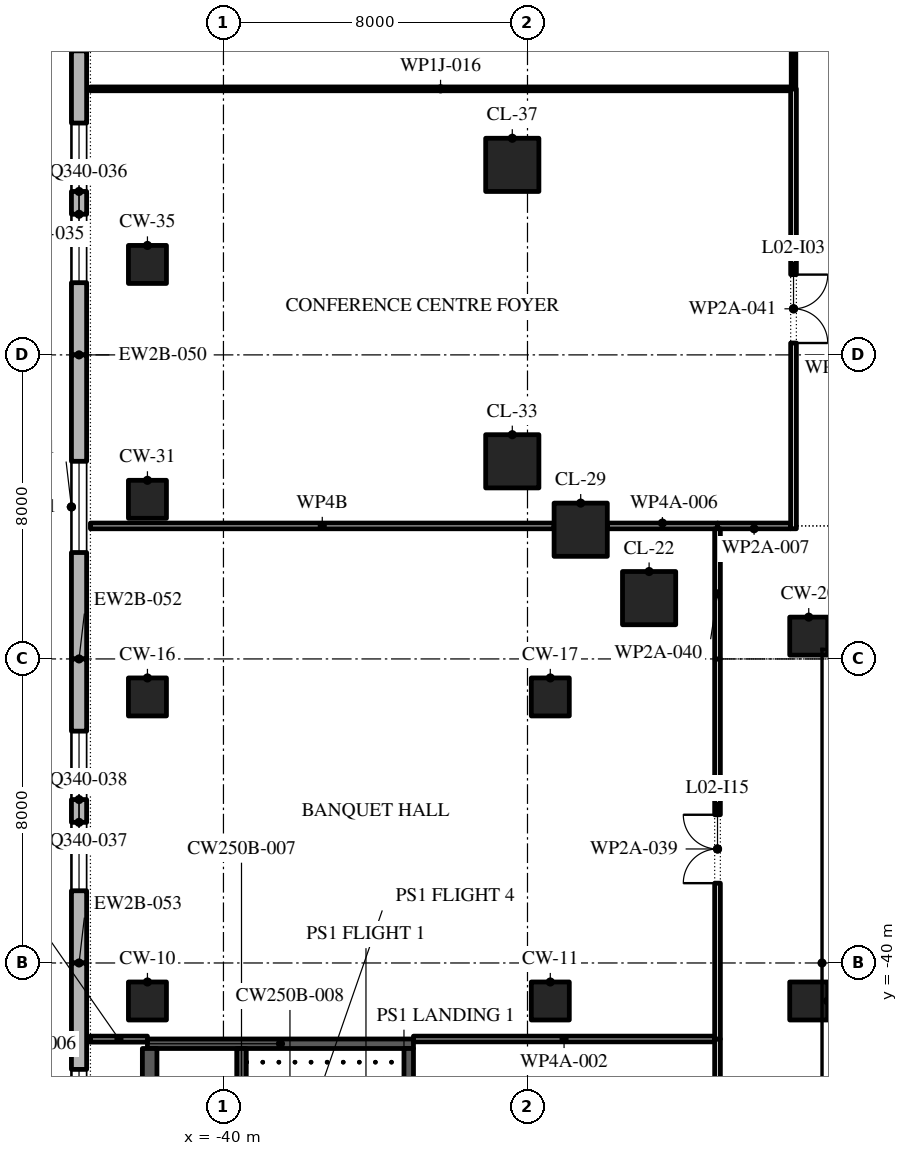
"""IFC4 building model, lengths in metres.
Left out: names, types, materials, properties, quantities, classifications, styles, units other than length and angle.
Written with IfcOpenShell. Run it as: python <this file> out.ifc"""

import sys

from ifc_helpers import new_model, si_unit, direction, frame, frame_2d, origin, origin_2d, place, context, subcontext, project, spatial, polyline, rectangle, outline, extrude, element, fill, save


model = new_model("IFC4")
c1 = context("Model", 3, precision=1e-05, world=origin(), true_north=direction((0.0, 1.0)))
c2 = subcontext(c1, "Body", "Model", "MODEL_VIEW")
j1 = project(units=[si_unit("LENGTHUNIT", "METRE"), si_unit("PLANEANGLEUNIT", "RADIAN")], contexts=[c1])
p1 = place(None, origin())
s1 = spatial("IfcSite", under=j1, at=p1, CompositionType="ELEMENT")
p2 = place(p1, origin())
s2 = spatial("IfcBuilding", under=s1, at=p2, CompositionType="ELEMENT")
p3 = place(p2, frame((0.0, 0.0, 14.0)))
s3 = spatial("IfcBuildingStorey", under=s2, at=p3, CompositionType="ELEMENT", Elevation=14.0)
for number, where, z_axis, x_axis in (
    (1, (-42.0, -41.0, 0.0), (0.0, 0.0, 1.0), (1.0, 0.0, 0.0)),
    (2, (-31.4, -41.0, 0.0), (0.0, 0.0, 1.0), (1.0, 0.0, 0.0)),
    (3, (-24.6, -41.0, 0.0), (0.0, 0.0, 1.0), (1.0, 0.0, 0.0)),
    (4, (-42.0, -33.0, 0.0), (0.0, 0.0, 1.0), (1.0, 0.0, 0.0)),
    (5, (-31.4, -33.0, 0.0), (0.0, 0.0, 1.0), (1.0, 0.0, 0.0)),
    (6, (-24.6, -31.4, 0.0), (0.0, 0.0, 1.0), (1.0, 0.0, 0.0)),
):
    element("IfcColumn", number, at=place(p3, frame(where, z_axis=z_axis, x_axis=x_axis)), inside=s3, PredefinedType="COLUMN", context=c2, shape_type="SweptSolid", body=[
        extrude(rectangle(XDim=1.0, YDim=1.0, at=origin_2d()), origin(), (0.0, 0.0, 1.0), 5.2),
    ])
for number, where, z_axis, x_axis in (
    (7, (-28.8, -30.4, 0.0), (0.0, 0.0, 1.0), (1.0, 0.0, 0.0)),
    (8, (-30.6, -28.6, 0.0), (0.0, 0.0, 1.0), (1.0, 0.0, 0.0)),
):
    element("IfcColumn", number, at=place(p3, frame(where, z_axis=z_axis, x_axis=x_axis)), inside=s3, PredefinedType="COLUMN", context=c2, shape_type="SweptSolid", body=[
        extrude(rectangle(XDim=1.4, YDim=1.4, at=origin_2d()), origin(), (0.0, 0.0, 1.0), 5.2),
    ])
p4 = place(p3, frame((-42.0, -27.8, 0.0), z_axis=(0.0, 0.0, 1.0), x_axis=(1.0, 0.0, 0.0)))
e9 = element("IfcColumn", 9, at=p4, inside=s3, PredefinedType="COLUMN", context=c2, shape_type="SweptSolid", body=[
    extrude(rectangle(XDim=1.0, YDim=1.0, at=origin_2d()), origin(), (0.0, 0.0, 1.0), 5.2),
])
p5 = place(p3, frame((-32.4, -26.8, 0.0), z_axis=(0.0, 0.0, 1.0), x_axis=(1.0, 0.0, 0.0)))
e10 = element("IfcColumn", 10, at=p5, inside=s3, PredefinedType="COLUMN", context=c2, shape_type="SweptSolid", body=[
    extrude(rectangle(XDim=1.4, YDim=1.4, at=origin_2d()), origin(), (0.0, 0.0, 1.0), 5.2),
])
p6 = place(p3, frame((-42.0, -21.62, 0.0), z_axis=(0.0, 0.0, 1.0), x_axis=(1.0, 0.0, 0.0)))
e11 = element("IfcColumn", 11, at=p6, inside=s3, PredefinedType="COLUMN", context=c2, shape_type="SweptSolid", body=[
    extrude(rectangle(XDim=1.0, YDim=1.0, at=origin_2d()), origin(), (0.0, 0.0, 1.0), 5.2),
])
p7 = place(p3, frame((-32.4, -19.0, 0.0), z_axis=(0.0, 0.0, 1.0), x_axis=(1.0, 0.0, 0.0)))
e12 = element("IfcColumn", 12, at=p7, inside=s3, PredefinedType="COLUMN", context=c2, shape_type="SweptSolid", body=[
    extrude(rectangle(XDim=1.4, YDim=1.4, at=origin_2d()), origin(), (0.0, 0.0, 1.0), 5.2),
])
p8 = place(p3, frame((-43.8, -16.0, 0.0), z_axis=(0.0, 0.0, 1.0), x_axis=(0.0, -1.0, 0.0)))
e13 = element("IfcWall", 13, at=p8, inside=s3, PredefinedType="STANDARD", context=c2, shape_type="SweptSolid", body=[
    extrude(rectangle(XDim=8.0, YDim=0.4, at=frame_2d((4.0, 0.0))), origin(), (0.0, 0.0, 1.0), 4.9),
])
p9 = place(p8, frame((1.9, 0.0, 0.9)))
e14 = element("IfcOpeningElement", 14, at=p9, cuts=e13, PredefinedType="OPENING", context=c2, shape_type="SweptSolid", body=[
    extrude(outline(polyline([(0.0, 0.0), (1.8, 0.0), (1.8, 1.841), (1.785, 2.076), (1.739, 2.307), (1.663, 2.53), (1.559, 2.741), (1.428, 2.937), (1.273, 3.114), (1.096, 3.269), (0.9, 3.4), (0.704, 3.269), (0.527, 3.114), (0.372, 2.937), (0.241, 2.741), (0.137, 2.53), (0.061, 2.307), (0.015, 2.076), (0.0, 1.841), (0.0, 0.0)])), frame((0.0, 0.21, 0.0), z_axis=(0.0, -1.0, 0.0), x_axis=(1.0, 0.0, 0.0)), (0.0, 0.0, 1.0), 0.42),
])
p10 = place(p8, frame((4.3, 0.0, 0.9)))
e15 = element("IfcOpeningElement", 15, at=p10, cuts=e13, PredefinedType="OPENING", context=c2, shape_type="SweptSolid", body=[
    extrude(outline(polyline([(0.0, 0.0), (1.8, 0.0), (1.8, 1.841), (1.785, 2.076), (1.739, 2.307), (1.663, 2.53), (1.559, 2.741), (1.428, 2.937), (1.273, 3.114), (1.096, 3.269), (0.9, 3.4), (0.704, 3.269), (0.527, 3.114), (0.372, 2.937), (0.241, 2.741), (0.137, 2.53), (0.061, 2.307), (0.015, 2.076), (0.0, 1.841), (0.0, 0.0)])), frame((0.0, 0.21, 0.0), z_axis=(0.0, -1.0, 0.0), x_axis=(1.0, 0.0, 0.0)), (0.0, 0.0, 1.0), 0.42),
])
p11 = place(p3, frame((-43.8, -24.0, 0.0), z_axis=(0.0, 0.0, 1.0), x_axis=(0.0, -1.0, 0.0)))
e16 = element("IfcWall", 16, at=p11, inside=s3, PredefinedType="STANDARD", context=c2, shape_type="SweptSolid", body=[
    extrude(rectangle(XDim=8.0, YDim=0.4, at=frame_2d((4.0, 0.0))), origin(), (0.0, 0.0, 1.0), 4.9),
])
p12 = place(p11, frame((2.8, 0.0, 0.9)))
e17 = element("IfcOpeningElement", 17, at=p12, cuts=e16, PredefinedType="OPENING", context=c2, shape_type="SweptSolid", body=[
    extrude(outline(polyline([(0.0, 0.0), (2.4, 0.0), (2.4, 1.7), (2.379, 1.976), (2.315, 2.246), (2.212, 2.502), (2.07, 2.74), (1.893, 2.954), (1.686, 3.137), (1.453, 3.287), (1.2, 3.4), (0.947, 3.287), (0.714, 3.137), (0.507, 2.954), (0.33, 2.74), (0.188, 2.502), (0.084, 2.246), (0.021, 1.976), (0.0, 1.7), (0.0, 0.0)])), frame((0.0, 0.21, 0.0), z_axis=(0.0, -1.0, 0.0), x_axis=(1.0, 0.0, 0.0)), (0.0, 0.0, 1.0), 0.42),
])
p13 = place(p3, frame((-43.8, -32.0, 0.0), z_axis=(0.0, 0.0, 1.0), x_axis=(0.0, -1.0, 0.0)))
e18 = element("IfcWall", 18, at=p13, inside=s3, PredefinedType="STANDARD", context=c2, shape_type="SweptSolid", body=[
    extrude(rectangle(XDim=8.0, YDim=0.4, at=frame_2d((4.0, 0.0))), origin(), (0.0, 0.0, 1.0), 4.9),
])
p14 = place(p13, frame((1.9, 0.0, 0.9)))
e19 = element("IfcOpeningElement", 19, at=p14, cuts=e18, PredefinedType="OPENING", context=c2, shape_type="SweptSolid", body=[
    extrude(outline(polyline([(0.0, 0.0), (1.8, 0.0), (1.8, 1.841), (1.785, 2.076), (1.739, 2.307), (1.663, 2.53), (1.559, 2.741), (1.428, 2.937), (1.273, 3.114), (1.096, 3.269), (0.9, 3.4), (0.704, 3.269), (0.527, 3.114), (0.372, 2.937), (0.241, 2.741), (0.137, 2.53), (0.061, 2.307), (0.015, 2.076), (0.0, 1.841), (0.0, 0.0)])), frame((0.0, 0.21, 0.0), z_axis=(0.0, -1.0, 0.0), x_axis=(1.0, 0.0, 0.0)), (0.0, 0.0, 1.0), 0.42),
])
p15 = place(p13, frame((4.3, 0.0, 0.9)))
e20 = element("IfcOpeningElement", 20, at=p15, cuts=e18, PredefinedType="OPENING", context=c2, shape_type="SweptSolid", body=[
    extrude(outline(polyline([(0.0, 0.0), (1.8, 0.0), (1.8, 1.841), (1.785, 2.076), (1.739, 2.307), (1.663, 2.53), (1.559, 2.741), (1.428, 2.937), (1.273, 3.114), (1.096, 3.269), (0.9, 3.4), (0.704, 3.269), (0.527, 3.114), (0.372, 2.937), (0.241, 2.741), (0.137, 2.53), (0.061, 2.307), (0.015, 2.076), (0.0, 1.841), (0.0, 0.0)])), frame((0.0, 0.21, 0.0), z_axis=(0.0, -1.0, 0.0), x_axis=(1.0, 0.0, 0.0)), (0.0, 0.0, 1.0), 0.42),
])
p16 = place(p3, frame((-43.8, -40.0, 0.0), z_axis=(0.0, 0.0, 1.0), x_axis=(0.0, -1.0, 0.0)))
e21 = element("IfcWall", 21, at=p16, inside=s3, PredefinedType="STANDARD", context=c2, shape_type="SweptSolid", body=[
    extrude(rectangle(XDim=8.0, YDim=0.4, at=frame_2d((4.0, 0.0))), origin(), (0.0, 0.0, 1.0), 4.9),
])
p17 = place(p16, frame((2.8, 0.0, 0.9)))
e22 = element("IfcOpeningElement", 22, at=p17, cuts=e21, PredefinedType="OPENING", context=c2, shape_type="SweptSolid", body=[
    extrude(outline(polyline([(0.0, 0.0), (2.4, 0.0), (2.4, 1.7), (2.379, 1.976), (2.315, 2.246), (2.212, 2.502), (2.07, 2.74), (1.893, 2.954), (1.686, 3.137), (1.453, 3.287), (1.2, 3.4), (0.947, 3.287), (0.714, 3.137), (0.507, 2.954), (0.33, 2.74), (0.188, 2.502), (0.084, 2.246), (0.021, 1.976), (0.0, 1.7), (0.0, 0.0)])), frame((0.0, 0.21, 0.0), z_axis=(0.0, -1.0, 0.0), x_axis=(1.0, 0.0, 0.0)), (0.0, 0.0, 1.0), 0.42),
])
p18 = place(p3, frame((-42.0, -42.125, 0.0), z_axis=(0.0, 0.0, 1.0), x_axis=(1.0, 0.0, 0.0)))
e23 = element("IfcWall", 23, at=p18, inside=s3, PredefinedType="SHEAR", context=c2, shape_type="SweptSolid", body=[
    extrude(rectangle(XDim=7.0, YDim=0.25, at=frame_2d((3.5, 0.0))), origin(), (0.0, 0.0, 1.0), 4.9),
])
p19 = place(p3, frame((-41.942, -49.5, 0.0), z_axis=(0.0, 0.0, 1.0), x_axis=(0.0, 1.0, 0.0)))
e24 = element("IfcWall", 24, at=p19, inside=s3, PredefinedType="SHEAR", context=c2, shape_type="SweptSolid", body=[
    extrude(rectangle(XDim=7.25, YDim=0.384, at=frame_2d((3.625, 0.0))), origin(), (0.0, 0.0, 1.0), 4.9),
])
p20 = place(p19, frame((3.05, 0.0, 0.0)))
e25 = element("IfcOpeningElement", 25, at=p20, cuts=e24, PredefinedType="OPENING", context=c2, shape_type="SweptSolid", body=[
    extrude(rectangle(XDim=0.9, YDim=2.1, at=frame_2d((0.45, 1.05))), frame((0.0, 0.202, 0.0), z_axis=(0.0, -1.0, 0.0), x_axis=(1.0, 0.0, 0.0)), (0.0, 0.0, 1.0), 0.404),
])
p21 = place(p3, frame((-35.125, -49.75, 0.0), z_axis=(0.0, 0.0, 1.0), x_axis=(0.0, 1.0, 0.0)))
e26 = element("IfcWall", 26, at=p21, inside=s3, PredefinedType="SHEAR", context=c2, shape_type="SweptSolid", body=[
    extrude(rectangle(XDim=7.5, YDim=0.25, at=frame_2d((3.75, 0.0))), origin(), (0.0, 0.0, 1.0), 4.9),
])
p22 = place(p21, frame((0.6, 0.0, 0.0)))
e27 = element("IfcOpeningElement", 27, at=p22, cuts=e26, PredefinedType="OPENING", context=c2, shape_type="SweptSolid", body=[
    extrude(rectangle(XDim=1.2, YDim=2.1, at=frame_2d((0.6, 1.05))), frame((0.0, 0.135, 0.0), z_axis=(0.0, -1.0, 0.0), x_axis=(1.0, 0.0, 0.0)), (0.0, 0.0, 1.0), 0.27),
])
p23 = place(p3, frame((-39.525, -49.75, 0.0), z_axis=(0.0, 0.0, 1.0), x_axis=(0.0, 1.0, 0.0)))
e28 = element("IfcWall", 28, at=p23, inside=s3, PredefinedType="SHEAR", context=c2, shape_type="SweptSolid", body=[
    extrude(rectangle(XDim=7.5, YDim=0.25, at=frame_2d((3.75, 0.0))), origin(), (0.0, 0.0, 1.0), 4.9),
])
p24 = place(p3, frame((-43.5, -42.0, 0.0), z_axis=(0.0, 0.0, 1.0), x_axis=(1.0, 0.0, 0.0)))
e29 = element("IfcWall", 29, at=p24, inside=s3, PredefinedType="PARTITIONING", context=c2, shape_type="SweptSolid", body=[
    extrude(rectangle(XDim=1.5, YDim=0.15, at=frame_2d((0.75, 0.0))), origin(), (0.0, 0.0, 1.0), 4.9),
])
p25 = place(p3, frame((-35.0, -42.0, 0.0), z_axis=(0.0, 0.0, 1.0), x_axis=(1.0, 0.0, 0.0)))
e30 = element("IfcWall", 30, at=p25, inside=s3, PredefinedType="PARTITIONING", context=c2, shape_type="SweptSolid", body=[
    extrude(rectangle(XDim=7.925, YDim=0.15, at=frame_2d((3.962, 0.0))), origin(), (0.0, 0.0, 1.0), 4.9),
])
p26 = place(p3, frame((-43.5, -28.5, 0.0), z_axis=(0.0, 0.0, 1.0), x_axis=(1.0, 0.0, 0.0)))
e31 = element("IfcWall", 31, at=p26, inside=s3, PredefinedType="PARTITIONING", context=c2, shape_type="SweptSolid", body=[
    extrude(rectangle(XDim=12.2, YDim=0.15, at=frame_2d((6.1, 0.0))), origin(), (0.0, 0.0, 1.0), 4.364),
])
p27 = place(p3, frame((-29.9, -28.5, 0.0), z_axis=(0.0, 0.0, 1.0), x_axis=(1.0, 0.0, 0.0)))
e32 = element("IfcWall", 32, at=p27, inside=s3, PredefinedType="PARTITIONING", context=c2, shape_type="SweptSolid", body=[
    extrude(rectangle(XDim=2.9, YDim=0.15, at=frame_2d((1.45, 0.0))), origin(), (0.0, 0.0, 1.0), 4.9),
])
p28 = place(p3, frame((-27.0, -28.5, 0.0), z_axis=(0.0, 0.0, 1.0), x_axis=(1.0, 0.0, 0.0)))
e33 = element("IfcWall", 33, at=p28, inside=s3, PredefinedType="PARTITIONING", context=c2, shape_type="SweptSolid", body=[
    extrude(rectangle(XDim=1.925, YDim=0.15, at=frame_2d((0.962, 0.0))), origin(), (0.0, 0.0, 1.0), 4.9),
])
p29 = place(p3, frame((-43.5, -17.0, 0.0), z_axis=(0.0, 0.0, 1.0), x_axis=(1.0, 0.0, 0.0)))
e34 = element("IfcWall", 34, at=p29, inside=s3, PredefinedType="PARTITIONING", context=c2, shape_type="SweptSolid", body=[
    extrude(rectangle(XDim=18.425, YDim=0.1, at=frame_2d((9.212, 0.0))), origin(), (0.0, 0.0, 1.0), 4.9),
])
p30 = place(p3, frame((-27.0, -48.0, 0.0), z_axis=(0.0, 0.0, 1.0), x_axis=(0.0, 1.0, 0.0)))
e35 = element("IfcWall", 35, at=p30, inside=s3, PredefinedType="PARTITIONING", context=c2, shape_type="SweptSolid", body=[
    extrude(rectangle(XDim=6.0, YDim=0.15, at=frame_2d((3.0, 0.0))), origin(), (0.0, 0.0, 1.0), 4.9),
])
p31 = place(p30, frame((2.5, 0.0, 0.0)))
e36 = element("IfcOpeningElement", 36, at=p31, cuts=e35, PredefinedType="OPENING", context=c2, shape_type="SweptSolid", body=[
    extrude(rectangle(XDim=1.0, YDim=2.1, at=frame_2d((0.5, 1.05))), frame((0.0, 0.085, 0.0), z_axis=(0.0, -1.0, 0.0), x_axis=(1.0, 0.0, 0.0)), (0.0, 0.0, 1.0), 0.17),
])
p32 = place(p3, frame((-27.0, -42.0, 0.0), z_axis=(0.0, 0.0, 1.0), x_axis=(0.0, 1.0, 0.0)))
e37 = element("IfcWall", 37, at=p32, inside=s3, PredefinedType="PARTITIONING", context=c2, shape_type="SweptSolid", body=[
    extrude(rectangle(XDim=10.0, YDim=0.15, at=frame_2d((5.0, 0.0))), origin(), (0.0, 0.0, 1.0), 4.9),
])
p33 = place(p32, frame((4.1, 0.0, 0.0)))
e38 = element("IfcOpeningElement", 38, at=p33, cuts=e37, PredefinedType="OPENING", context=c2, shape_type="SweptSolid", body=[
    extrude(rectangle(XDim=1.8, YDim=2.1, at=frame_2d((0.9, 1.05))), frame((0.0, 0.085, 0.0), z_axis=(0.0, -1.0, 0.0), x_axis=(1.0, 0.0, 0.0)), (0.0, 0.0, 1.0), 0.17),
])
p34 = place(p3, frame((-27.0, -32.0, 0.0), z_axis=(0.0, 0.0, 1.0), x_axis=(0.0, 1.0, 0.0)))
e39 = element("IfcWall", 39, at=p34, inside=s3, PredefinedType="PARTITIONING", context=c2, shape_type="SweptSolid", body=[
    extrude(rectangle(XDim=3.425, YDim=0.15, at=frame_2d((1.712, 0.0))), origin(), (0.0, 0.0, 1.0), 4.9),
])
p35 = place(p3, frame((-25.0, -28.575, 0.0), z_axis=(0.0, 0.0, 1.0), x_axis=(0.0, 1.0, 0.0)))
e40 = element("IfcWall", 40, at=p35, inside=s3, PredefinedType="PARTITIONING", context=c2, shape_type="SweptSolid", body=[
    extrude(rectangle(XDim=11.575, YDim=0.15, at=frame_2d((5.788, 0.0))), origin(), (0.0, 0.0, 1.0), 4.9),
])
p36 = place(p35, frame((4.887, 0.0, 0.0)))
e41 = element("IfcOpeningElement", 41, at=p36, cuts=e40, PredefinedType="OPENING", context=c2, shape_type="SweptSolid", body=[
    extrude(rectangle(XDim=1.8, YDim=2.1, at=frame_2d((0.9, 1.05))), frame((0.0, 0.085, 0.0), z_axis=(0.0, -1.0, 0.0), x_axis=(1.0, 0.0, 0.0)), (0.0, 0.0, 1.0), 0.17),
])
p37 = place(p3, frame((-25.0, -17.0, 0.0), z_axis=(0.0, 0.0, 1.0), x_axis=(0.0, 1.0, 0.0)))
e42 = element("IfcWall", 42, at=p37, inside=s3, PredefinedType="PARTITIONING", context=c2, shape_type="SweptSolid", body=[
    extrude(rectangle(XDim=11.0, YDim=0.12, at=frame_2d((5.5, 0.0))), origin(), (0.0, 0.0, 1.0), 4.9),
])
p38 = place(p37, frame((4.6, 0.0, 0.0)))
e43 = element("IfcOpeningElement", 43, at=p38, cuts=e42, PredefinedType="OPENING", context=c2, shape_type="SweptSolid", body=[
    extrude(rectangle(XDim=1.8, YDim=2.1, at=frame_2d((0.9, 1.05))), frame((0.0, 0.07, 0.0), z_axis=(0.0, -1.0, 0.0), x_axis=(1.0, 0.0, 0.0)), (0.0, 0.0, 1.0), 0.14),
])
p39 = place(p9, origin())
e44 = element("IfcWindow", 44, at=p39, inside=s3, PartitioningType="DOUBLE_PANEL_VERTICAL", PredefinedType="WINDOW", context=c2, shape_type="SweptSolid", body=[
    extrude(outline(polyline([(0.0, 0.0), (1.8, 0.0), (1.8, 1.841), (1.785, 2.076), (1.739, 2.307), (1.663, 2.53), (1.559, 2.741), (1.428, 2.937), (1.273, 3.114), (1.096, 3.269), (0.9, 3.4), (0.704, 3.269), (0.527, 3.114), (0.372, 2.937), (0.241, 2.741), (0.137, 2.53), (0.061, 2.307), (0.015, 2.076), (0.0, 1.841), (0.0, 0.0)])), frame((0.0, 0.03, 0.0), z_axis=(0.0, -1.0, 0.0), x_axis=(1.0, 0.0, 0.0)), (0.0, 0.0, 1.0), 0.06),
])
fill(e14, e44)
p40 = place(p10, origin())
e45 = element("IfcWindow", 45, at=p40, inside=s3, PartitioningType="DOUBLE_PANEL_VERTICAL", PredefinedType="WINDOW", context=c2, shape_type="SweptSolid", body=[
    extrude(outline(polyline([(0.0, 0.0), (1.8, 0.0), (1.8, 1.841), (1.785, 2.076), (1.739, 2.307), (1.663, 2.53), (1.559, 2.741), (1.428, 2.937), (1.273, 3.114), (1.096, 3.269), (0.9, 3.4), (0.704, 3.269), (0.527, 3.114), (0.372, 2.937), (0.241, 2.741), (0.137, 2.53), (0.061, 2.307), (0.015, 2.076), (0.0, 1.841), (0.0, 0.0)])), frame((0.0, 0.03, 0.0), z_axis=(0.0, -1.0, 0.0), x_axis=(1.0, 0.0, 0.0)), (0.0, 0.0, 1.0), 0.06),
])
fill(e15, e45)
p41 = place(p12, origin())
e46 = element("IfcWindow", 46, at=p41, inside=s3, PartitioningType="DOUBLE_PANEL_VERTICAL", PredefinedType="WINDOW", context=c2, shape_type="SweptSolid", body=[
    extrude(outline(polyline([(0.0, 0.0), (2.4, 0.0), (2.4, 1.7), (2.379, 1.976), (2.315, 2.246), (2.212, 2.502), (2.07, 2.74), (1.893, 2.954), (1.686, 3.137), (1.453, 3.287), (1.2, 3.4), (0.947, 3.287), (0.714, 3.137), (0.507, 2.954), (0.33, 2.74), (0.188, 2.502), (0.084, 2.246), (0.021, 1.976), (0.0, 1.7), (0.0, 0.0)])), frame((0.0, 0.03, 0.0), z_axis=(0.0, -1.0, 0.0), x_axis=(1.0, 0.0, 0.0)), (0.0, 0.0, 1.0), 0.06),
])
fill(e17, e46)
p42 = place(p14, origin())
e47 = element("IfcWindow", 47, at=p42, inside=s3, PartitioningType="DOUBLE_PANEL_VERTICAL", PredefinedType="WINDOW", context=c2, shape_type="SweptSolid", body=[
    extrude(outline(polyline([(0.0, 0.0), (1.8, 0.0), (1.8, 1.841), (1.785, 2.076), (1.739, 2.307), (1.663, 2.53), (1.559, 2.741), (1.428, 2.937), (1.273, 3.114), (1.096, 3.269), (0.9, 3.4), (0.704, 3.269), (0.527, 3.114), (0.372, 2.937), (0.241, 2.741), (0.137, 2.53), (0.061, 2.307), (0.015, 2.076), (0.0, 1.841), (0.0, 0.0)])), frame((0.0, 0.03, 0.0), z_axis=(0.0, -1.0, 0.0), x_axis=(1.0, 0.0, 0.0)), (0.0, 0.0, 1.0), 0.06),
])
fill(e19, e47)
p43 = place(p15, origin())
e48 = element("IfcWindow", 48, at=p43, inside=s3, PartitioningType="DOUBLE_PANEL_VERTICAL", PredefinedType="WINDOW", context=c2, shape_type="SweptSolid", body=[
    extrude(outline(polyline([(0.0, 0.0), (1.8, 0.0), (1.8, 1.841), (1.785, 2.076), (1.739, 2.307), (1.663, 2.53), (1.559, 2.741), (1.428, 2.937), (1.273, 3.114), (1.096, 3.269), (0.9, 3.4), (0.704, 3.269), (0.527, 3.114), (0.372, 2.937), (0.241, 2.741), (0.137, 2.53), (0.061, 2.307), (0.015, 2.076), (0.0, 1.841), (0.0, 0.0)])), frame((0.0, 0.03, 0.0), z_axis=(0.0, -1.0, 0.0), x_axis=(1.0, 0.0, 0.0)), (0.0, 0.0, 1.0), 0.06),
])
fill(e20, e48)
p44 = place(p17, origin())
e49 = element("IfcWindow", 49, at=p44, inside=s3, PartitioningType="DOUBLE_PANEL_VERTICAL", PredefinedType="WINDOW", context=c2, shape_type="SweptSolid", body=[
    extrude(outline(polyline([(0.0, 0.0), (2.4, 0.0), (2.4, 1.7), (2.379, 1.976), (2.315, 2.246), (2.212, 2.502), (2.07, 2.74), (1.893, 2.954), (1.686, 3.137), (1.453, 3.287), (1.2, 3.4), (0.947, 3.287), (0.714, 3.137), (0.507, 2.954), (0.33, 2.74), (0.188, 2.502), (0.084, 2.246), (0.021, 1.976), (0.0, 1.7), (0.0, 0.0)])), frame((0.0, 0.03, 0.0), z_axis=(0.0, -1.0, 0.0), x_axis=(1.0, 0.0, 0.0)), (0.0, 0.0, 1.0), 0.06),
])
fill(e22, e49)
p45 = place(p36, frame((1.8, 0.0, 0.0), z_axis=(0.0, 0.0, 1.0), x_axis=(-1.0, 0.0, 0.0)))
e50 = element("IfcDoor", 50, at=p45, inside=s3, OperationType="SINGLE_SWING_RIGHT", PredefinedType="DOOR", context=c2, shape_type="SweptSolid", body=[
    extrude(rectangle(XDim=1.8, YDim=2.1, at=frame_2d((0.9, 1.05))), frame((0.0, 0.025, 0.0), z_axis=(0.0, -1.0, 0.0), x_axis=(1.0, 0.0, 0.0)), (0.0, 0.0, 1.0), 0.05),
])
fill(e41, e50)
p46 = place(p33, origin())
e51 = element("IfcDoor", 51, at=p46, inside=s3, OperationType="SINGLE_SWING_LEFT", PredefinedType="DOOR", context=c2, shape_type="SweptSolid", body=[
    extrude(rectangle(XDim=1.8, YDim=2.1, at=frame_2d((0.9, 1.05))), frame((0.0, 0.025, 0.0), z_axis=(0.0, -1.0, 0.0), x_axis=(1.0, 0.0, 0.0)), (0.0, 0.0, 1.0), 0.05),
])
fill(e38, e51)
save(model, sys.argv[1])
